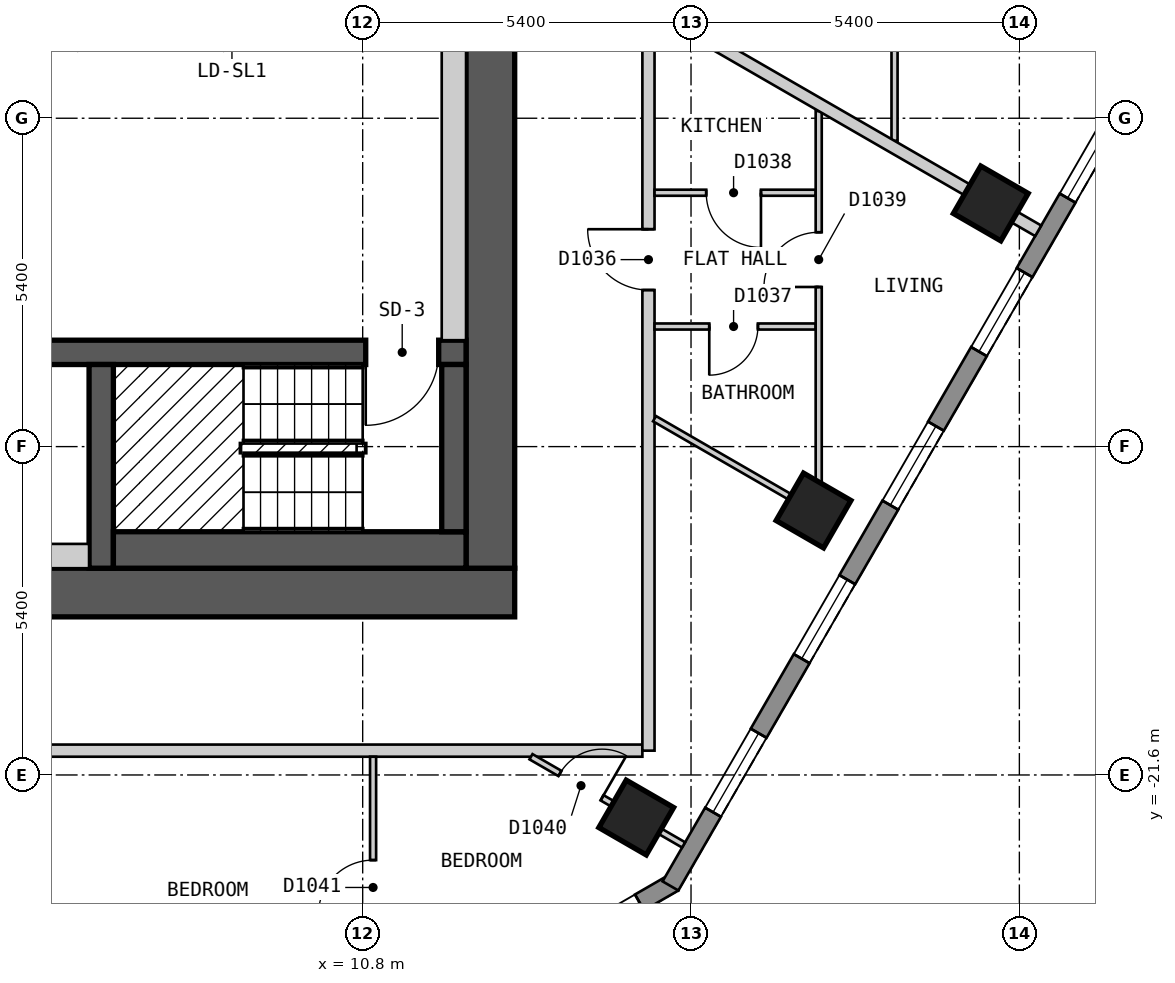
"""IFC4 building model, lengths in metres.
Left out: names, types, materials, properties, quantities, classifications, styles, units other than length and angle.
Written with IfcOpenShell. Run it as: python <this file> out.ifc"""

import sys

from ifc_helpers import new_model, si_unit, direction, frame, frame_2d, origin, origin_2d, place, context, subcontext, project, spatial, polyline, rectangle, outline, extrude, element, fill, save


model = new_model("IFC4")
c1 = context("Model", 3, precision=1e-05, world=origin(), true_north=direction((0.0, 1.0)))
c2 = subcontext(c1, "Body", "Model", "MODEL_VIEW")
j1 = project(units=[si_unit("LENGTHUNIT", "METRE"), si_unit("PLANEANGLEUNIT", "RADIAN")], contexts=[c1])
p1 = place(None, origin())
s1 = spatial("IfcSite", under=j1, at=p1, CompositionType="ELEMENT")
p2 = place(p1, origin())
s2 = spatial("IfcBuilding", under=s1, at=p2, CompositionType="ELEMENT")
p3 = place(p2, frame((0.0, 0.0, 120.6)))
s3 = spatial("IfcBuildingStorey", under=s2, at=p3, CompositionType="ELEMENT", Elevation=120.6)
for number, where, z_axis, x_axis in (
    (1, (15.299, -22.3, 0.0), (0.0, 0.0, 1.0), (0.5, 0.866, 0.0)),
    (2, (18.215, -17.251, 0.0), (0.0, 0.0, 1.0), (0.5, 0.866, 0.0)),
    (3, (21.13, -12.201, 0.0), (0.0, 0.0, 1.0), (0.5, 0.866, 0.0)),
):
    element("IfcColumn", number, at=place(p3, frame(where, z_axis=z_axis, x_axis=x_axis)), inside=s3, PredefinedType="COLUMN", context=c2, shape_type="SweptSolid", body=[
        extrude(rectangle(XDim=0.9, YDim=0.9, at=origin_2d()), origin(), (0.0, 0.0, 1.0), 3.0),
    ])
p4 = place(p3, frame((-13.3, -18.6, 0.0), z_axis=(0.0, 0.0, 1.0), x_axis=(1.0, 0.0, 0.0)))
e4 = element("IfcWall", 4, at=p4, inside=s3, PredefinedType="SHEAR", context=c2, shape_type="SweptSolid", body=[
    extrude(rectangle(XDim=26.6, YDim=0.8, at=frame_2d((13.3, 0.0))), origin(), (0.0, 0.0, 1.0), 2.7),
])
p5 = place(p3, frame((12.9, -18.2, 0.0), z_axis=(0.0, 0.0, 1.0), x_axis=(0.0, 1.0, 0.0)))
e5 = element("IfcWall", 5, at=p5, inside=s3, PredefinedType="SHEAR", context=c2, shape_type="SweptSolid", body=[
    extrude(rectangle(XDim=12.4, YDim=0.8, at=frame_2d((6.2, 0.0))), origin(), (0.0, 0.0, 1.0), 2.7),
])
p6 = place(p3, frame((-12.5, -14.65, 0.0), z_axis=(0.0, 0.0, 1.0), x_axis=(1.0, 0.0, 0.0)))
e6 = element("IfcWall", 6, at=p6, inside=s3, PredefinedType="SHEAR", context=c2, shape_type="SweptSolid", body=[
    extrude(rectangle(XDim=25.0, YDim=0.4, at=frame_2d((12.5, 0.0))), origin(), (0.0, 0.0, 1.0), 2.7),
])
p7 = place(p6, frame((1.7, 0.0, 0.0), z_axis=(0.0, 0.0, 1.0), x_axis=(-1.0, 0.0, 0.0)))
e7 = element("IfcOpeningElement", 7, at=p7, cuts=e6, PredefinedType="OPENING", context=c2, shape_type="SweptSolid", body=[
    extrude(rectangle(XDim=1.2, YDim=2.1, at=frame_2d((0.6, 1.05))), frame((0.0, 0.21, 0.0), z_axis=(0.0, -1.0, 0.0), x_axis=(1.0, 0.0, 0.0)), (0.0, 0.0, 1.0), 0.42),
])
p8 = place(p6, frame((24.55, 0.0, 0.0), z_axis=(0.0, 0.0, 1.0), x_axis=(-1.0, 0.0, 0.0)))
e8 = element("IfcOpeningElement", 8, at=p8, cuts=e6, PredefinedType="OPENING", context=c2, shape_type="SweptSolid", body=[
    extrude(rectangle(XDim=1.2, YDim=2.1, at=frame_2d((0.6, 1.05))), frame((0.0, 0.21, 0.0), z_axis=(0.0, -1.0, 0.0), x_axis=(1.0, 0.0, 0.0)), (0.0, 0.0, 1.0), 0.42),
])
p9 = place(p6, frame((9.65, 0.0, 0.0), z_axis=(0.0, 0.0, 1.0), x_axis=(-1.0, 0.0, 0.0)))
e9 = element("IfcOpeningElement", 9, at=p9, cuts=e6, PredefinedType="OPENING", context=c2, shape_type="SweptSolid", body=[
    extrude(rectangle(XDim=1.0, YDim=2.1, at=frame_2d((0.5, 1.05))), frame((0.0, 0.21, 0.0), z_axis=(0.0, -1.0, 0.0), x_axis=(1.0, 0.0, 0.0)), (0.0, 0.0, 1.0), 0.42),
])
p10 = place(p6, frame((16.05, 0.0, 0.0), z_axis=(0.0, 0.0, 1.0), x_axis=(-1.0, 0.0, 0.0)))
e10 = element("IfcOpeningElement", 10, at=p10, cuts=e6, PredefinedType="OPENING", context=c2, shape_type="SweptSolid", body=[
    extrude(rectangle(XDim=1.0, YDim=2.1, at=frame_2d((0.5, 1.05))), frame((0.0, 0.21, 0.0), z_axis=(0.0, -1.0, 0.0), x_axis=(1.0, 0.0, 0.0)), (0.0, 0.0, 1.0), 0.42),
])
p11 = place(p3, frame((6.5, -18.2, 0.0), z_axis=(0.0, 0.0, 1.0), x_axis=(0.0, 1.0, 0.0)))
e11 = element("IfcWall", 11, at=p11, inside=s3, PredefinedType="SHEAR", context=c2, shape_type="SweptSolid", body=[
    extrude(rectangle(XDim=3.35, YDim=0.4, at=frame_2d((1.675, 0.0))), origin(), (0.0, 0.0, 1.0), 2.7),
])
p12 = place(p3, frame((11.587, -25.87, 0.0), z_axis=(0.0, 0.0, 1.0), x_axis=(0.866022959057, 0.500004234368, 0.0)))
e12 = element("IfcWall", 12, at=p12, inside=s3, PredefinedType="SOLIDWALL", context=c2, shape_type="SweptSolid", body=[
    extrude(outline(polyline([(0.0, -0.15), (5.0, -0.15), (4.92, 0.15), (0.08, 0.15), (0.0, -0.15)])), origin(), (0.0, 0.0, 1.0), 2.7),
])
p13 = place(p12, frame((0.65, 0.0, 0.15)))
e13 = element("IfcOpeningElement", 13, at=p13, cuts=e12, PredefinedType="OPENING", context=c2, shape_type="SweptSolid", body=[
    extrude(rectangle(XDim=1.2, YDim=2.1, at=frame_2d((0.6, 1.05))), frame((0.0, 0.16, 0.0), z_axis=(0.0, -1.0, 0.0), x_axis=(1.0, 0.0, 0.0)), (0.0, 0.0, 1.0), 0.32),
])
p14 = place(p12, frame((3.149, 0.0, 0.15)))
e14 = element("IfcOpeningElement", 14, at=p14, cuts=e12, PredefinedType="OPENING", context=c2, shape_type="SweptSolid", body=[
    extrude(rectangle(XDim=1.2, YDim=2.1, at=frame_2d((0.6, 1.05))), frame((0.0, 0.16, 0.0), z_axis=(0.0, -1.0, 0.0), x_axis=(1.0, 0.0, 0.0)), (0.0, 0.0, 1.0), 0.32),
])
p15 = place(p3, frame((15.862, -23.425, 0.0), z_axis=(0.0, 0.0, 1.0), x_axis=(0.500017503135, 0.866015298109, 0.0)))
e15 = element("IfcWall", 15, at=p15, inside=s3, PredefinedType="SOLIDWALL", context=c2, shape_type="SweptSolid", body=[
    extrude(outline(polyline([(0.0, -0.15), (24.711, -0.15), (24.631, 0.15), (0.08, 0.15), (0.0, -0.15)])), origin(), (0.0, 0.0, 1.0), 2.7),
])
p16 = place(p15, frame((1.4, 0.0, 0.15)))
e16 = element("IfcOpeningElement", 16, at=p16, cuts=e15, PredefinedType="OPENING", context=c2, shape_type="SweptSolid", body=[
    extrude(rectangle(XDim=1.5, YDim=2.1, at=frame_2d((0.75, 1.05))), frame((0.0, 0.16, 0.0), z_axis=(0.0, -1.0, 0.0), x_axis=(1.0, 0.0, 0.0)), (0.0, 0.0, 1.0), 0.32),
])
p17 = place(p15, frame((4.316, 0.0, 0.15)))
e17 = element("IfcOpeningElement", 17, at=p17, cuts=e15, PredefinedType="OPENING", context=c2, shape_type="SweptSolid", body=[
    extrude(rectangle(XDim=1.5, YDim=2.1, at=frame_2d((0.75, 1.05))), frame((0.0, 0.16, 0.0), z_axis=(0.0, -1.0, 0.0), x_axis=(1.0, 0.0, 0.0)), (0.0, 0.0, 1.0), 0.32),
])
p18 = place(p15, frame((7.231, 0.0, 0.15)))
e18 = element("IfcOpeningElement", 18, at=p18, cuts=e15, PredefinedType="OPENING", context=c2, shape_type="SweptSolid", body=[
    extrude(rectangle(XDim=1.5, YDim=2.1, at=frame_2d((0.75, 1.05))), frame((0.0, 0.16, 0.0), z_axis=(0.0, -1.0, 0.0), x_axis=(1.0, 0.0, 0.0)), (0.0, 0.0, 1.0), 0.32),
])
p19 = place(p15, frame((10.147, 0.0, 0.15)))
e19 = element("IfcOpeningElement", 19, at=p19, cuts=e15, PredefinedType="OPENING", context=c2, shape_type="SweptSolid", body=[
    extrude(rectangle(XDim=1.5, YDim=2.1, at=frame_2d((0.75, 1.05))), frame((0.0, 0.16, 0.0), z_axis=(0.0, -1.0, 0.0), x_axis=(1.0, 0.0, 0.0)), (0.0, 0.0, 1.0), 0.32),
])
p20 = place(p15, frame((13.062, 0.0, 0.15)))
e20 = element("IfcOpeningElement", 20, at=p20, cuts=e15, PredefinedType="OPENING", context=c2, shape_type="SweptSolid", body=[
    extrude(rectangle(XDim=1.5, YDim=2.1, at=frame_2d((0.75, 1.05))), frame((0.0, 0.16, 0.0), z_axis=(0.0, -1.0, 0.0), x_axis=(1.0, 0.0, 0.0)), (0.0, 0.0, 1.0), 0.32),
])
p21 = place(p15, frame((15.977, 0.0, 0.15)))
e21 = element("IfcOpeningElement", 21, at=p21, cuts=e15, PredefinedType="OPENING", context=c2, shape_type="SweptSolid", body=[
    extrude(rectangle(XDim=1.5, YDim=2.1, at=frame_2d((0.75, 1.05))), frame((0.0, 0.16, 0.0), z_axis=(0.0, -1.0, 0.0), x_axis=(1.0, 0.0, 0.0)), (0.0, 0.0, 1.0), 0.32),
])
p22 = place(p15, frame((18.893, 0.0, 0.15)))
e22 = element("IfcOpeningElement", 22, at=p22, cuts=e15, PredefinedType="OPENING", context=c2, shape_type="SweptSolid", body=[
    extrude(rectangle(XDim=1.5, YDim=2.1, at=frame_2d((0.75, 1.05))), frame((0.0, 0.16, 0.0), z_axis=(0.0, -1.0, 0.0), x_axis=(1.0, 0.0, 0.0)), (0.0, 0.0, 1.0), 0.32),
])
p23 = place(p15, frame((21.809, 0.0, 0.15)))
e23 = element("IfcOpeningElement", 23, at=p23, cuts=e15, PredefinedType="OPENING", context=c2, shape_type="SweptSolid", body=[
    extrude(rectangle(XDim=1.5, YDim=2.1, at=frame_2d((0.75, 1.05))), frame((0.0, 0.16, 0.0), z_axis=(0.0, -1.0, 0.0), x_axis=(1.0, 0.0, 0.0)), (0.0, 0.0, 1.0), 0.32),
])
p24 = place(p3, frame((-15.499, -21.2, 0.0), z_axis=(0.0, 0.0, 1.0), x_axis=(1.0, 0.0, 0.0)))
e24 = element("IfcWall", 24, at=p24, inside=s3, PredefinedType="PARTITIONING", context=c2, shape_type="SweptSolid", body=[
    extrude(rectangle(XDim=30.899, YDim=0.2, at=frame_2d((15.449, 0.0))), origin(), (0.0, 0.0, 1.0), 2.7),
])
p25 = place(p24, frame((12.258, 0.0, 0.0)))
e25 = element("IfcOpeningElement", 25, at=p25, cuts=e24, PredefinedType="OPENING", context=c2, shape_type="SweptSolid", body=[
    extrude(rectangle(XDim=1.0, YDim=2.1, at=frame_2d((0.5, 1.05))), frame((0.0, 0.11, 0.0), z_axis=(0.0, -1.0, 0.0), x_axis=(1.0, 0.0, 0.0)), (0.0, 0.0, 1.0), 0.22),
])
p26 = place(p3, frame((15.5, -21.2, 0.0), z_axis=(0.0, 0.0, 1.0), x_axis=(0.0, 1.0, 0.0)))
e26 = element("IfcWall", 26, at=p26, inside=s3, PredefinedType="PARTITIONING", context=c2, shape_type="SweptSolid", body=[
    extrude(rectangle(XDim=17.648, YDim=0.2, at=frame_2d((8.824, 0.0))), origin(), (0.0, 0.0, 1.0), 2.7),
])
p27 = place(p26, frame((7.575, 0.0, 0.0)))
e27 = element("IfcOpeningElement", 27, at=p27, cuts=e26, PredefinedType="OPENING", context=c2, shape_type="SweptSolid", body=[
    extrude(rectangle(XDim=1.0, YDim=2.1, at=frame_2d((0.5, 1.05))), frame((0.0, 0.11, 0.0), z_axis=(0.0, -1.0, 0.0), x_axis=(1.0, 0.0, 0.0)), (0.0, 0.0, 1.0), 0.22),
])
p28 = place(p3, frame((15.6, -15.741, 0.0), z_axis=(0.0, 0.0, 1.0), x_axis=(0.866010195725, -0.500026340207, 0.0)))
e28 = element("IfcWall", 28, at=p28, inside=s3, PredefinedType="PARTITIONING", context=c2, shape_type="SweptSolid", body=[
    extrude(rectangle(XDim=3.06, YDim=0.1, at=frame_2d((1.53, 0.0))), origin(), (0.0, 0.0, 1.0), 2.7),
])
p29 = place(p3, frame((13.568, -21.3, 0.0), z_axis=(0.0, 0.0, 1.0), x_axis=(0.865885342641, -0.500242514586, 0.0)))
e29 = element("IfcWall", 29, at=p29, inside=s3, PredefinedType="PARTITIONING", context=c2, shape_type="SweptSolid", body=[
    extrude(rectangle(XDim=2.898, YDim=0.1, at=frame_2d((1.449, 0.0))), origin(), (0.0, 0.0, 1.0), 2.7),
])
p30 = place(p29, frame((0.55, 0.0, 0.0)))
e30 = element("IfcOpeningElement", 30, at=p30, cuts=e29, PredefinedType="OPENING", context=c2, shape_type="SweptSolid", body=[
    extrude(rectangle(XDim=0.8, YDim=2.1, at=frame_2d((0.4, 1.05))), frame((0.0, 0.06, 0.0), z_axis=(0.0, -1.0, 0.0), x_axis=(1.0, 0.0, 0.0)), (0.0, 0.0, 1.0), 0.12),
])
p31 = place(p3, frame((15.6, -12.025, 0.0), z_axis=(0.0, 0.0, 1.0), x_axis=(1.0, 0.0, 0.0)))
e31 = element("IfcWall", 31, at=p31, inside=s3, PredefinedType="PARTITIONING", context=c2, shape_type="SweptSolid", body=[
    extrude(rectangle(XDim=2.65, YDim=0.1, at=frame_2d((1.325, 0.0))), origin(), (0.0, 0.0, 1.0), 2.7),
])
p32 = place(p31, frame((0.85, 0.0, 0.0)))
e32 = element("IfcOpeningElement", 32, at=p32, cuts=e31, PredefinedType="OPENING", context=c2, shape_type="SweptSolid", body=[
    extrude(rectangle(XDim=0.9, YDim=2.1, at=frame_2d((0.45, 1.05))), frame((0.0, 0.06, 0.0), z_axis=(0.0, -1.0, 0.0), x_axis=(1.0, 0.0, 0.0)), (0.0, 0.0, 1.0), 0.12),
])
p33 = place(p3, frame((15.6, -14.225, 0.0), z_axis=(0.0, 0.0, 1.0), x_axis=(1.0, 0.0, 0.0)))
e33 = element("IfcWall", 33, at=p33, inside=s3, PredefinedType="PARTITIONING", context=c2, shape_type="SweptSolid", body=[
    extrude(rectangle(XDim=2.65, YDim=0.1, at=frame_2d((1.325, 0.0))), origin(), (0.0, 0.0, 1.0), 2.7),
])
p34 = place(p33, frame((0.9, 0.0, 0.0)))
e34 = element("IfcOpeningElement", 34, at=p34, cuts=e33, PredefinedType="OPENING", context=c2, shape_type="SweptSolid", body=[
    extrude(rectangle(XDim=0.8, YDim=2.1, at=frame_2d((0.4, 1.05))), frame((0.0, 0.06, 0.0), z_axis=(0.0, -1.0, 0.0), x_axis=(1.0, 0.0, 0.0)), (0.0, 0.0, 1.0), 0.12),
])
p35 = place(p3, frame((10.971, -25.7, 0.0), z_axis=(0.0, 0.0, 1.0), x_axis=(0.0, 1.0, 0.0)))
e35 = element("IfcWall", 35, at=p35, inside=s3, PredefinedType="PARTITIONING", context=c2, shape_type="SweptSolid", body=[
    extrude(rectangle(XDim=4.4, YDim=0.1, at=frame_2d((2.2, 0.0))), origin(), (0.0, 0.0, 1.0), 2.7),
])
p36 = place(p35, frame((1.8, 0.0, 0.0)))
e36 = element("IfcOpeningElement", 36, at=p36, cuts=e35, PredefinedType="OPENING", context=c2, shape_type="SweptSolid", body=[
    extrude(rectangle(XDim=0.9, YDim=2.1, at=frame_2d((0.45, 1.05))), frame((0.0, 0.06, 0.0), z_axis=(0.0, -1.0, 0.0), x_axis=(1.0, 0.0, 0.0)), (0.0, 0.0, 1.0), 0.12),
])
p37 = place(p3, frame((18.3, -17.3, 0.0), z_axis=(0.0, 0.0, 1.0), x_axis=(0.0, 1.0, 0.0)))
e37 = element("IfcWall", 37, at=p37, inside=s3, PredefinedType="PARTITIONING", context=c2, shape_type="SweptSolid", body=[
    extrude(rectangle(XDim=6.618, YDim=0.1, at=frame_2d((3.309, 0.0))), origin(), (0.0, 0.0, 1.0), 2.7),
])
p38 = place(p37, frame((3.725, 0.0, 0.0)))
e38 = element("IfcOpeningElement", 38, at=p38, cuts=e37, PredefinedType="OPENING", context=c2, shape_type="SweptSolid", body=[
    extrude(rectangle(XDim=0.9, YDim=2.1, at=frame_2d((0.45, 1.05))), frame((0.0, 0.06, 0.0), z_axis=(0.0, -1.0, 0.0), x_axis=(1.0, 0.0, 0.0)), (0.0, 0.0, 1.0), 0.12),
])
p39 = place(p3, frame((19.547, -11.171, 0.0), z_axis=(0.0, 0.0, 1.0), x_axis=(0.0, 1.0, 0.0)))
e39 = element("IfcWall", 39, at=p39, inside=s3, PredefinedType="PARTITIONING", context=c2, shape_type="SweptSolid", body=[
    extrude(rectangle(XDim=6.534, YDim=0.1, at=frame_2d((3.267, 0.0))), origin(), (0.0, 0.0, 1.0), 2.7),
])
p40 = place(p39, frame((2.81, 0.0, 0.0)))
e40 = element("IfcOpeningElement", 40, at=p40, cuts=e39, PredefinedType="OPENING", context=c2, shape_type="SweptSolid", body=[
    extrude(rectangle(XDim=0.8, YDim=2.1, at=frame_2d((0.4, 1.05))), frame((0.0, 0.06, 0.0), z_axis=(0.0, -1.0, 0.0), x_axis=(1.0, 0.0, 0.0)), (0.0, 0.0, 1.0), 0.12),
])
p41 = place(p3, frame((15.6, -9.008, 0.0), z_axis=(0.0, 0.0, 1.0), x_axis=(0.866034366408, -0.499984475959, 0.0)))
e41 = element("IfcWall", 41, at=p41, inside=s3, PredefinedType="PARTITIONING", context=c2, shape_type="SweptSolid", body=[
    extrude(rectangle(XDim=7.286, YDim=0.2, at=frame_2d((3.643, 0.0))), origin(), (0.0, 0.0, 1.0), 2.7),
])
p42 = place(p3, frame((-6.3, -18.0, 0.0), z_axis=(0.0, 0.0, 1.0), x_axis=(1.0, 0.0, 0.0)))
e42 = element("IfcWall", 42, at=p42, inside=s3, PredefinedType="PARTITIONING", context=c2, shape_type="SweptSolid", body=[
    extrude(rectangle(XDim=12.6, YDim=0.4, at=frame_2d((6.3, 0.0))), origin(), (0.0, 0.0, 1.0), 2.7),
])
p43 = place(p3, frame((6.7, -17.9, 0.0), z_axis=(0.0, 0.0, 1.0), x_axis=(1.0, 0.0, 0.0)))
e43 = element("IfcWall", 43, at=p43, inside=s3, PredefinedType="SOLIDWALL", context=c2, shape_type="SweptSolid", body=[
    extrude(rectangle(XDim=5.8, YDim=0.6, at=frame_2d((2.9, 0.0))), origin(), (0.0, 0.0, 1.0), 2.7),
])
p44 = place(p3, frame((12.3, -17.6, 0.0), z_axis=(0.0, 0.0, 1.0), x_axis=(0.0, 1.0, 0.0)))
e44 = element("IfcWall", 44, at=p44, inside=s3, PredefinedType="SOLIDWALL", context=c2, shape_type="SweptSolid", body=[
    extrude(rectangle(XDim=2.75, YDim=0.4, at=frame_2d((1.375, 0.0))), origin(), (0.0, 0.0, 1.0), 2.7),
])
p45 = place(p3, frame((12.3, -14.45, 0.0), z_axis=(0.0, 0.0, 1.0), x_axis=(0.0, 1.0, 0.0)))
e45 = element("IfcWall", 45, at=p45, inside=s3, PredefinedType="PARTITIONING", context=c2, shape_type="SweptSolid", body=[
    extrude(rectangle(XDim=8.25, YDim=0.4, at=frame_2d((4.125, 0.0))), origin(), (0.0, 0.0, 1.0), 2.7),
])
p46 = place(p14, origin())
e46 = element("IfcWindow", 46, at=p46, inside=s3, PartitioningType="SINGLE_PANEL", PredefinedType="WINDOW", context=c2, shape_type="SweptSolid", body=[
    extrude(rectangle(XDim=1.2, YDim=2.1, at=frame_2d((0.6, 1.05))), frame((0.0, 0.03, 0.0), z_axis=(0.0, -1.0, 0.0), x_axis=(1.0, 0.0, 0.0)), (0.0, 0.0, 1.0), 0.06),
])
fill(e14, e46)
p47 = place(p16, origin())
e47 = element("IfcWindow", 47, at=p47, inside=s3, PartitioningType="SINGLE_PANEL", PredefinedType="WINDOW", context=c2, shape_type="SweptSolid", body=[
    extrude(rectangle(XDim=1.5, YDim=2.1, at=frame_2d((0.75, 1.05))), frame((0.0, 0.03, 0.0), z_axis=(0.0, -1.0, 0.0), x_axis=(1.0, 0.0, 0.0)), (0.0, 0.0, 1.0), 0.06),
])
fill(e16, e47)
p48 = place(p17, origin())
e48 = element("IfcWindow", 48, at=p48, inside=s3, PartitioningType="SINGLE_PANEL", PredefinedType="WINDOW", context=c2, shape_type="SweptSolid", body=[
    extrude(rectangle(XDim=1.5, YDim=2.1, at=frame_2d((0.75, 1.05))), frame((0.0, 0.03, 0.0), z_axis=(0.0, -1.0, 0.0), x_axis=(1.0, 0.0, 0.0)), (0.0, 0.0, 1.0), 0.06),
])
fill(e17, e48)
p49 = place(p18, origin())
e49 = element("IfcWindow", 49, at=p49, inside=s3, PartitioningType="SINGLE_PANEL", PredefinedType="WINDOW", context=c2, shape_type="SweptSolid", body=[
    extrude(rectangle(XDim=1.5, YDim=2.1, at=frame_2d((0.75, 1.05))), frame((0.0, 0.03, 0.0), z_axis=(0.0, -1.0, 0.0), x_axis=(1.0, 0.0, 0.0)), (0.0, 0.0, 1.0), 0.06),
])
fill(e18, e49)
p50 = place(p19, origin())
e50 = element("IfcWindow", 50, at=p50, inside=s3, PartitioningType="SINGLE_PANEL", PredefinedType="WINDOW", context=c2, shape_type="SweptSolid", body=[
    extrude(rectangle(XDim=1.5, YDim=2.1, at=frame_2d((0.75, 1.05))), frame((0.0, 0.03, 0.0), z_axis=(0.0, -1.0, 0.0), x_axis=(1.0, 0.0, 0.0)), (0.0, 0.0, 1.0), 0.06),
])
fill(e19, e50)
p51 = place(p20, origin())
e51 = element("IfcWindow", 51, at=p51, inside=s3, PartitioningType="SINGLE_PANEL", PredefinedType="WINDOW", context=c2, shape_type="SweptSolid", body=[
    extrude(rectangle(XDim=1.5, YDim=2.1, at=frame_2d((0.75, 1.05))), frame((0.0, 0.03, 0.0), z_axis=(0.0, -1.0, 0.0), x_axis=(1.0, 0.0, 0.0)), (0.0, 0.0, 1.0), 0.06),
])
fill(e20, e51)
p52 = place(p27, origin())
e52 = element("IfcDoor", 52, at=p52, inside=s3, OperationType="SINGLE_SWING_RIGHT", PredefinedType="DOOR", context=c2, shape_type="SweptSolid", body=[
    extrude(rectangle(XDim=1.0, YDim=2.1, at=frame_2d((0.5, 1.05))), frame((0.0, 0.025, 0.0), z_axis=(0.0, -1.0, 0.0), x_axis=(1.0, 0.0, 0.0)), (0.0, 0.0, 1.0), 0.05),
])
fill(e27, e52)
p53 = place(p34, origin())
e53 = element("IfcDoor", 53, at=p53, inside=s3, OperationType="SINGLE_SWING_LEFT", PredefinedType="DOOR", context=c2, shape_type="SweptSolid", body=[
    extrude(rectangle(XDim=0.8, YDim=2.1, at=frame_2d((0.4, 1.05))), frame((0.0, 0.025, 0.0), z_axis=(0.0, -1.0, 0.0), x_axis=(1.0, 0.0, 0.0)), (0.0, 0.0, 1.0), 0.05),
])
fill(e34, e53)
p54 = place(p32, origin())
e54 = element("IfcDoor", 54, at=p54, inside=s3, OperationType="SINGLE_SWING_RIGHT", PredefinedType="DOOR", context=c2, shape_type="SweptSolid", body=[
    extrude(rectangle(XDim=0.9, YDim=2.1, at=frame_2d((0.45, 1.05))), frame((0.0, 0.025, 0.0), z_axis=(0.0, -1.0, 0.0), x_axis=(1.0, 0.0, 0.0)), (0.0, 0.0, 1.0), 0.05),
])
fill(e32, e54)
p55 = place(p38, origin())
e55 = element("IfcDoor", 55, at=p55, inside=s3, OperationType="SINGLE_SWING_LEFT", PredefinedType="DOOR", context=c2, shape_type="SweptSolid", body=[
    extrude(rectangle(XDim=0.9, YDim=2.1, at=frame_2d((0.45, 1.05))), frame((0.0, 0.025, 0.0), z_axis=(0.0, -1.0, 0.0), x_axis=(1.0, 0.0, 0.0)), (0.0, 0.0, 1.0), 0.05),
])
fill(e38, e55)
p56 = place(p30, origin())
e56 = element("IfcDoor", 56, at=p56, inside=s3, OperationType="SINGLE_SWING_RIGHT", PredefinedType="DOOR", context=c2, shape_type="SweptSolid", body=[
    extrude(rectangle(XDim=0.8, YDim=2.1, at=frame_2d((0.4, 1.05))), frame((0.0, 0.025, 0.0), z_axis=(0.0, -1.0, 0.0), x_axis=(1.0, 0.0, 0.0)), (0.0, 0.0, 1.0), 0.05),
])
fill(e30, e56)
p57 = place(p36, origin())
e57 = element("IfcDoor", 57, at=p57, inside=s3, OperationType="SINGLE_SWING_LEFT", PredefinedType="DOOR", context=c2, shape_type="SweptSolid", body=[
    extrude(rectangle(XDim=0.9, YDim=2.1, at=frame_2d((0.45, 1.05))), frame((0.0, 0.025, 0.0), z_axis=(0.0, -1.0, 0.0), x_axis=(1.0, 0.0, 0.0)), (0.0, 0.0, 1.0), 0.05),
])
fill(e36, e57)
p58 = place(p8, origin())
e58 = element("IfcDoor", 58, at=p58, inside=s3, OperationType="SINGLE_SWING_RIGHT", PredefinedType="DOOR", context=c2, shape_type="SweptSolid", body=[
    extrude(rectangle(XDim=1.2, YDim=2.1, at=frame_2d((0.6, 1.05))), frame((0.0, 0.025, 0.0), z_axis=(0.0, -1.0, 0.0), x_axis=(1.0, 0.0, 0.0)), (0.0, 0.0, 1.0), 0.05),
])
fill(e8, e58)
save(model, sys.argv[1])
